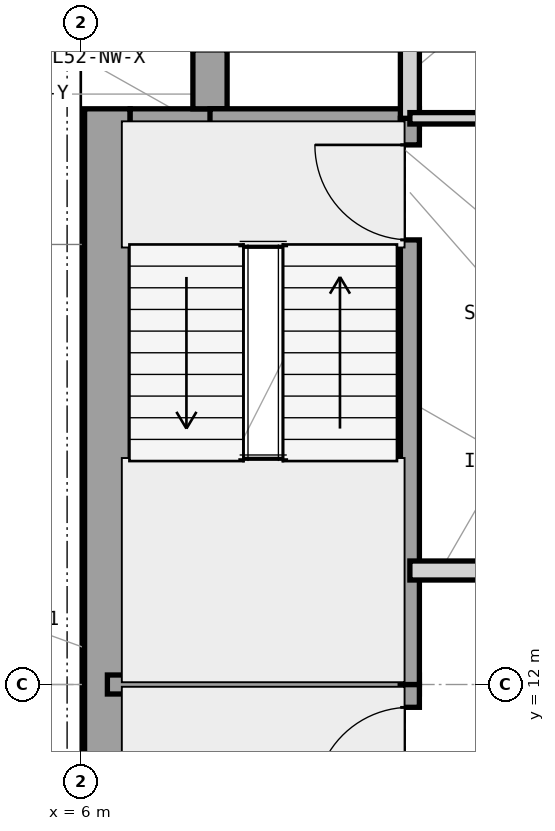
"""IFC4 building model, lengths in metres.
Left out: names, types, materials, properties, quantities, classifications, styles, units other than length and angle.
Written with IfcOpenShell. Run it as: python <this file> out.ifc"""

import sys

from ifc_helpers import new_model, si_unit, direction, frame, frame_2d, origin, place, context, subcontext, project, spatial, rectangle, extrude, element, fill, save


model = new_model("IFC4")
c1 = context("Model", 3, precision=1e-05, world=origin(), true_north=direction((0.0, 1.0)))
c2 = subcontext(c1, "Body", "Model", "MODEL_VIEW")
j1 = project(units=[si_unit("LENGTHUNIT", "METRE"), si_unit("PLANEANGLEUNIT", "RADIAN")], contexts=[c1])
p1 = place(None, origin())
s1 = spatial("IfcSite", under=j1, at=p1, CompositionType="ELEMENT")
p2 = place(p1, origin())
s2 = spatial("IfcBuilding", under=s1, at=p2, CompositionType="ELEMENT")
p3 = place(p2, frame((0.0, 0.0, 215.1)))
s3 = spatial("IfcBuildingStorey", under=s2, at=p3, CompositionType="ELEMENT", Elevation=215.1)
p4 = place(p3, frame((6.35, 4.425, 0.0), z_axis=(0.0, 0.0, 1.0), x_axis=(0.0, 1.0, 0.0)))
e1 = element("IfcWall", 1, at=p4, inside=s3, PredefinedType="SHEAR", context=c2, shape_type="SweptSolid", body=[
    extrude(rectangle(XDim=15.15, YDim=0.6, at=frame_2d((7.575, 0.0))), origin(), (0.0, 0.0, 1.0), 3.9),
])
p5 = place(p3, frame((6.65, 19.35, 0.0), z_axis=(0.0, 0.0, 1.0), x_axis=(1.0, 0.0, 0.0)))
e2 = element("IfcWall", 2, at=p5, inside=s3, PredefinedType="SHEAR", context=c2, shape_type="SweptSolid", body=[
    extrude(rectangle(XDim=1.275, YDim=0.45, at=frame_2d((0.638, 0.0))), origin(), (0.0, 0.0, 1.0), 3.9),
])
p6 = place(p3, frame((7.7, 19.575, 0.0), z_axis=(0.0, 0.0, 1.0), x_axis=(0.0, 1.0, 0.0)))
e3 = element("IfcWall", 3, at=p6, inside=s3, PredefinedType="SHEAR", context=c2, shape_type="SweptSolid", body=[
    extrude(rectangle(XDim=0.775, YDim=0.45, at=frame_2d((0.388, 0.0))), origin(), (0.0, 0.0, 1.0), 3.9),
])
p7 = place(p3, frame((6.35, 12.0, 0.0), z_axis=(0.0, 0.0, 1.0), x_axis=(1.0, 0.0, 0.0)))
e4 = element("IfcWall", 4, at=p7, inside=s3, PredefinedType="SHEAR", context=c2, shape_type="SweptSolid", body=[
    extrude(rectangle(XDim=4.105, YDim=0.25, at=frame_2d((2.052, 0.0))), origin(), (0.0, 0.0, 1.0), 3.9),
])
p8 = place(p3, frame((7.7, 19.45, 0.0), z_axis=(0.0, 0.0, 1.0), x_axis=(1.0, 0.0, 0.0)))
e5 = element("IfcWall", 5, at=p8, inside=s3, PredefinedType="SHEAR", context=c2, shape_type="SweptSolid", body=[
    extrude(rectangle(XDim=2.755, YDim=0.25, at=frame_2d((1.377, 0.0))), origin(), (0.0, 0.0, 1.0), 3.9),
])
p9 = place(p3, frame((10.33, 4.55, 0.0), z_axis=(0.0, 0.0, 1.0), x_axis=(0.0, 1.0, 0.0)))
e6 = element("IfcWall", 6, at=p9, inside=s3, PredefinedType="SHEAR", context=c2, shape_type="SweptSolid", body=[
    extrude(rectangle(XDim=7.45, YDim=0.25, at=frame_2d((3.725, 0.0))), origin(), (0.0, 0.0, 1.0), 3.9),
])
p10 = place(p9, frame((5.9, 0.0, 0.0)))
e7 = element("IfcOpeningElement", 7, at=p10, cuts=e6, PredefinedType="OPENING", context=c2, shape_type="SweptSolid", body=[
    extrude(rectangle(XDim=1.25, YDim=2.2, at=frame_2d((0.625, 1.1))), frame((0.0, 0.135, 0.0), z_axis=(0.0, -1.0, 0.0), x_axis=(1.0, 0.0, 0.0)), (0.0, 0.0, 1.0), 0.27),
])
p11 = place(p3, frame((10.33, 12.0, 0.0), z_axis=(0.0, 0.0, 1.0), x_axis=(0.0, 1.0, 0.0)))
e8 = element("IfcWall", 8, at=p11, inside=s3, PredefinedType="SHEAR", context=c2, shape_type="SweptSolid", body=[
    extrude(rectangle(XDim=7.45, YDim=0.25, at=frame_2d((3.725, 0.0))), origin(), (0.0, 0.0, 1.0), 3.9),
])
p12 = place(p11, frame((5.85, 0.0, 0.0)))
e9 = element("IfcOpeningElement", 9, at=p12, cuts=e8, PredefinedType="OPENING", context=c2, shape_type="SweptSolid", body=[
    extrude(rectangle(XDim=1.25, YDim=2.2, at=frame_2d((0.625, 1.1))), frame((0.0, 0.135, 0.0), z_axis=(0.0, -1.0, 0.0), x_axis=(1.0, 0.0, 0.0)), (0.0, 0.0, 1.0), 0.27),
])
p13 = place(p3, frame((10.33, 19.45, 0.0), z_axis=(0.0, 0.0, 1.0), x_axis=(0.0, 1.0, 0.0)))
e10 = element("IfcWall", 10, at=p13, inside=s3, PredefinedType="PARTITIONING", context=c2, shape_type="SweptSolid", body=[
    extrude(rectangle(XDim=1.2, YDim=0.25, at=frame_2d((0.6, 0.0))), origin(), (0.0, 0.0, 1.0), 3.69),
])
p14 = place(p3, frame((10.33, 13.5, 0.0), z_axis=(0.0, 0.0, 1.0), x_axis=(1.0, 0.0, 0.0)))
e11 = element("IfcWall", 11, at=p14, inside=s3, PredefinedType="PARTITIONING", context=c2, shape_type="SweptSolid", body=[
    extrude(rectangle(XDim=1.62, YDim=0.25, at=frame_2d((0.81, 0.0))), origin(), (0.0, 0.0, 1.0), 3.283),
])
p15 = place(p3, frame((10.33, 19.45, 0.0), z_axis=(0.0, 0.0, 1.0), x_axis=(1.0, 0.0, 0.0)))
e12 = element("IfcWall", 12, at=p15, inside=s3, PredefinedType="PARTITIONING", context=c2, shape_type="SweptSolid", body=[
    extrude(rectangle(XDim=3.82, YDim=0.15, at=frame_2d((1.91, 0.0))), origin(), (0.0, 0.0, 1.0), 3.69),
])
p16 = place(p15, frame((1.25, 0.0, 0.0)))
e13 = element("IfcOpeningElement", 13, at=p16, cuts=e12, PredefinedType="OPENING", context=c2, shape_type="SweptSolid", body=[
    extrude(rectangle(XDim=0.95, YDim=2.1, at=frame_2d((0.475, 1.05))), frame((0.0, 0.085, 0.0), z_axis=(0.0, -1.0, 0.0), x_axis=(1.0, 0.0, 0.0)), (0.0, 0.0, 1.0), 0.17),
])
p17 = place(p10, origin())
e14 = element("IfcDoor", 14, at=p17, inside=s3, OperationType="SINGLE_SWING_LEFT", PredefinedType="DOOR", context=c2, shape_type="SweptSolid", body=[
    extrude(rectangle(XDim=1.25, YDim=2.2, at=frame_2d((0.625, 1.1))), frame((0.0, 0.025, 0.0), z_axis=(0.0, -1.0, 0.0), x_axis=(1.0, 0.0, 0.0)), (0.0, 0.0, 1.0), 0.05),
])
fill(e7, e14)
p18 = place(p12, origin())
e15 = element("IfcDoor", 15, at=p18, inside=s3, OperationType="SINGLE_SWING_RIGHT", PredefinedType="DOOR", context=c2, shape_type="SweptSolid", body=[
    extrude(rectangle(XDim=1.25, YDim=2.2, at=frame_2d((0.625, 1.1))), frame((0.0, 0.025, 0.0), z_axis=(0.0, -1.0, 0.0), x_axis=(1.0, 0.0, 0.0)), (0.0, 0.0, 1.0), 0.05),
])
fill(e9, e15)
save(model, sys.argv[1])
